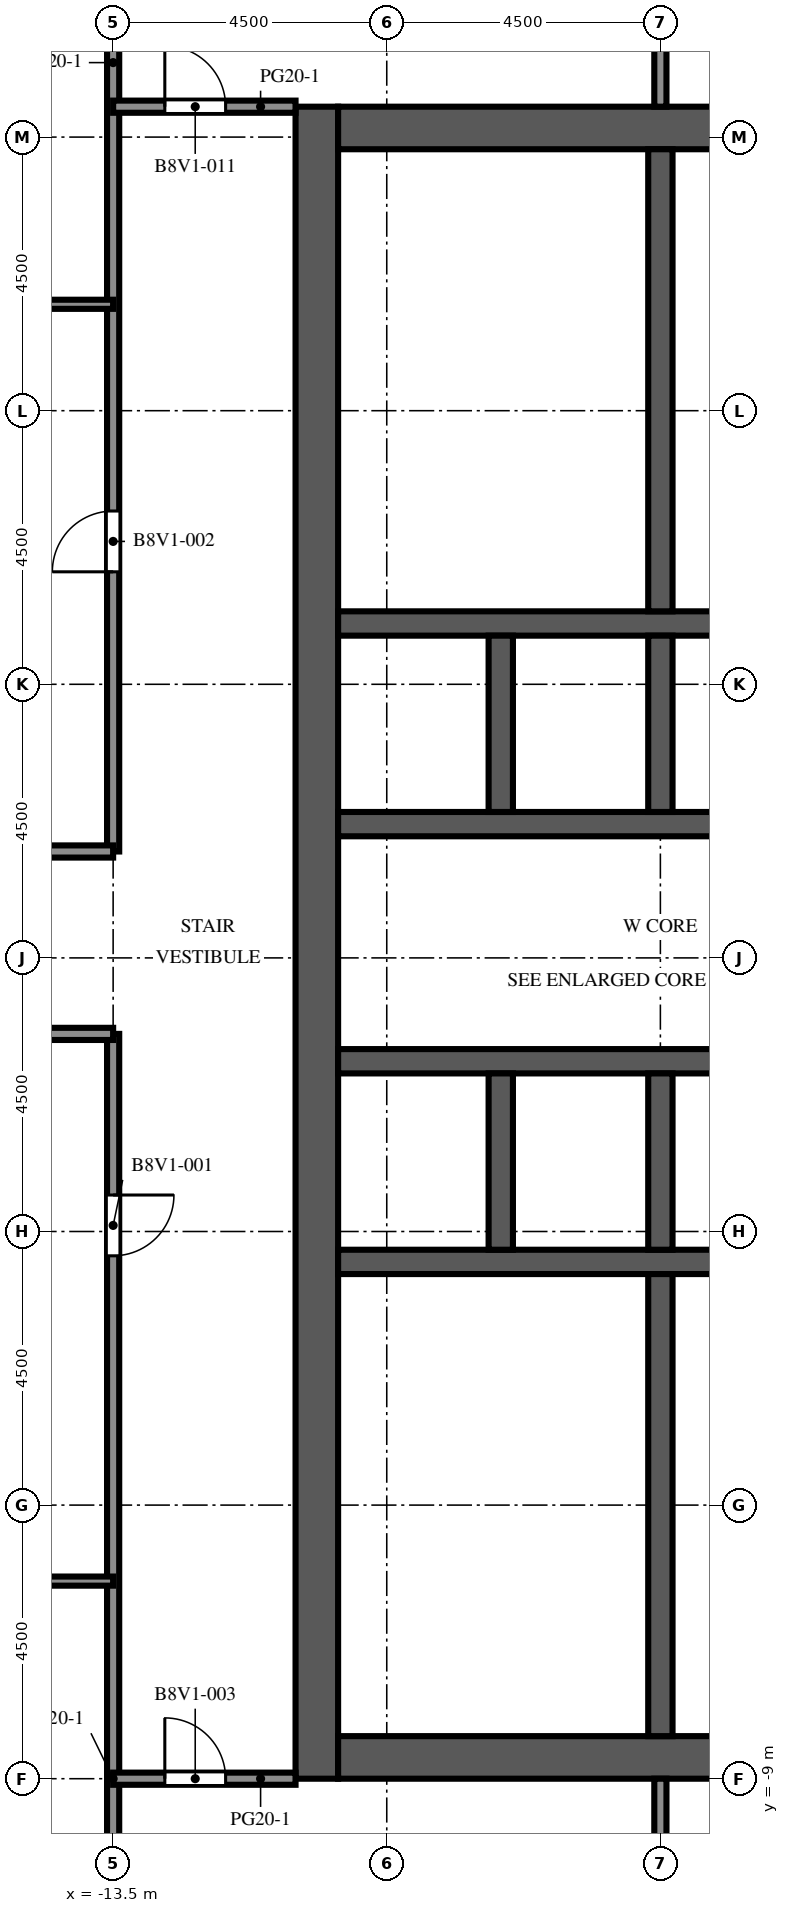
"""IFC4 building model, lengths in metres.
Left out: names, types, materials, properties, quantities, classifications, styles, units other than length and angle.
Written with IfcOpenShell. Run it as: python <this file> out.ifc"""

import sys

from ifc_helpers import new_model, si_unit, direction, frame, frame_2d, origin, place, context, subcontext, project, spatial, rectangle, extrude, element, fill, save


model = new_model("IFC4")
c1 = context("Model", 3, precision=1e-05, world=origin(), true_north=direction((0.0, 1.0)))
c2 = subcontext(c1, "Body", "Model", "MODEL_VIEW")
j1 = project(units=[si_unit("LENGTHUNIT", "METRE"), si_unit("PLANEANGLEUNIT", "RADIAN")], contexts=[c1])
p1 = place(None, origin())
s1 = spatial("IfcSite", under=j1, at=p1, CompositionType="ELEMENT")
p2 = place(p1, origin())
s2 = spatial("IfcBuilding", under=s1, at=p2, CompositionType="ELEMENT")
p3 = place(p2, frame((0.0, 0.0, 274.5)))
s3 = spatial("IfcBuildingStorey", under=s2, at=p3, CompositionType="ELEMENT", Elevation=274.5)
p4 = place(p3, frame((-10.15, -9.0, 0.0), z_axis=(0.0, 0.0, 1.0), x_axis=(0.0, 1.0, 0.0)))
e1 = element("IfcWall", 1, at=p4, inside=s3, PredefinedType="SHEAR", context=c2, shape_type="SweptSolid", body=[
    extrude(rectangle(XDim=27.5, YDim=0.7, at=frame_2d((13.75, 0.0))), origin(), (0.0, 0.0, 1.0), 4.1),
])
p5 = place(p4, frame((12.55, 0.0, 0.0)))
e2 = element("IfcOpeningElement", 2, at=p5, cuts=e1, PredefinedType="OPENING", context=c2, shape_type="SweptSolid", body=[
    extrude(rectangle(XDim=2.4, YDim=2.4, at=frame_2d((1.2, 1.2))), frame((0.0, 0.36, 0.0), z_axis=(0.0, -1.0, 0.0), x_axis=(1.0, 0.0, 0.0)), (0.0, 0.0, 1.0), 0.72),
])
p6 = place(p4, frame((6.825, 0.0, 0.0)))
e3 = element("IfcOpeningElement", 3, at=p6, cuts=e1, PredefinedType="OPENING", context=c2, shape_type="SweptSolid", body=[
    extrude(rectangle(XDim=1.2, YDim=2.1, at=frame_2d((0.6, 1.05))), frame((0.0, 0.36, 0.0), z_axis=(0.0, -1.0, 0.0), x_axis=(1.0, 0.0, 0.0)), (0.0, 0.0, 1.0), 0.72),
])
p7 = place(p4, frame((19.475, 0.0, 0.0)))
e4 = element("IfcOpeningElement", 4, at=p7, cuts=e1, PredefinedType="OPENING", context=c2, shape_type="SweptSolid", body=[
    extrude(rectangle(XDim=1.2, YDim=2.1, at=frame_2d((0.6, 1.05))), frame((0.0, 0.36, 0.0), z_axis=(0.0, -1.0, 0.0), x_axis=(1.0, 0.0, 0.0)), (0.0, 0.0, 1.0), 0.72),
])
for number, where, z_axis, x_axis in (
    (5, (-9.8, -8.65, 0.0), (0.0, 0.0, 1.0), (1.0, 0.0, 0.0)),
    (6, (-9.8, 18.15, 0.0), (0.0, 0.0, 1.0), (1.0, 0.0, 0.0)),
):
    element("IfcWall", number, at=place(p3, frame(where, z_axis=z_axis, x_axis=x_axis)), inside=s3, PredefinedType="SHEAR", context=c2, shape_type="SweptSolid", body=[
        extrude(rectangle(XDim=10.6, YDim=0.7, at=frame_2d((5.3, 0.0))), origin(), (0.0, 0.0, 1.0), 4.1),
    ])
p8 = place(p3, frame((-9.8, -0.5, 0.0), z_axis=(0.0, 0.0, 1.0), x_axis=(1.0, 0.0, 0.0)))
e7 = element("IfcWall", 7, at=p8, inside=s3, PredefinedType="SHEAR", context=c2, shape_type="SweptSolid", body=[
    extrude(rectangle(XDim=10.6, YDim=0.4, at=frame_2d((5.3, 0.0))), origin(), (0.0, 0.0, 1.0), 4.1),
])
p9 = place(p3, frame((-9.8, 2.8, 0.0), z_axis=(0.0, 0.0, 1.0), x_axis=(1.0, 0.0, 0.0)))
e8 = element("IfcWall", 8, at=p9, inside=s3, PredefinedType="SHEAR", context=c2, shape_type="SweptSolid", body=[
    extrude(rectangle(XDim=10.6, YDim=0.4, at=frame_2d((5.3, 0.0))), origin(), (0.0, 0.0, 1.0), 4.1),
])
p10 = place(p9, frame((0.688, 0.0, 0.0)))
e9 = element("IfcOpeningElement", 9, at=p10, cuts=e8, PredefinedType="OPENING", context=c2, shape_type="SweptSolid", body=[
    extrude(rectangle(XDim=1.1, YDim=2.1, at=frame_2d((0.55, 1.05))), frame((0.0, 0.21, 0.0), z_axis=(0.0, -1.0, 0.0), x_axis=(1.0, 0.0, 0.0)), (0.0, 0.0, 1.0), 0.42),
])
p11 = place(p9, frame((3.438, 0.0, 0.0)))
e10 = element("IfcOpeningElement", 10, at=p11, cuts=e8, PredefinedType="OPENING", context=c2, shape_type="SweptSolid", body=[
    extrude(rectangle(XDim=1.1, YDim=2.1, at=frame_2d((0.55, 1.05))), frame((0.0, 0.21, 0.0), z_axis=(0.0, -1.0, 0.0), x_axis=(1.0, 0.0, 0.0)), (0.0, 0.0, 1.0), 0.42),
])
p12 = place(p9, frame((6.113, 0.0, 0.0)))
e11 = element("IfcOpeningElement", 11, at=p12, cuts=e8, PredefinedType="OPENING", context=c2, shape_type="SweptSolid", body=[
    extrude(rectangle(XDim=1.0, YDim=2.1, at=frame_2d((0.5, 1.05))), frame((0.0, 0.21, 0.0), z_axis=(0.0, -1.0, 0.0), x_axis=(1.0, 0.0, 0.0)), (0.0, 0.0, 1.0), 0.42),
])
p13 = place(p9, frame((8.863, 0.0, 0.0)))
e12 = element("IfcOpeningElement", 12, at=p13, cuts=e8, PredefinedType="OPENING", context=c2, shape_type="SweptSolid", body=[
    extrude(rectangle(XDim=1.0, YDim=2.1, at=frame_2d((0.5, 1.05))), frame((0.0, 0.21, 0.0), z_axis=(0.0, -1.0, 0.0), x_axis=(1.0, 0.0, 0.0)), (0.0, 0.0, 1.0), 0.42),
])
p14 = place(p3, frame((-9.8, 6.7, 0.0), z_axis=(0.0, 0.0, 1.0), x_axis=(1.0, 0.0, 0.0)))
e13 = element("IfcWall", 13, at=p14, inside=s3, PredefinedType="SHEAR", context=c2, shape_type="SweptSolid", body=[
    extrude(rectangle(XDim=10.6, YDim=0.4, at=frame_2d((5.3, 0.0))), origin(), (0.0, 0.0, 1.0), 4.1),
])
p15 = place(p14, frame((3.438, 0.0, 0.0)))
e14 = element("IfcOpeningElement", 14, at=p15, cuts=e13, PredefinedType="OPENING", context=c2, shape_type="SweptSolid", body=[
    extrude(rectangle(XDim=1.1, YDim=2.1, at=frame_2d((0.55, 1.05))), frame((0.0, 0.21, 0.0), z_axis=(0.0, -1.0, 0.0), x_axis=(1.0, 0.0, 0.0)), (0.0, 0.0, 1.0), 0.42),
])
p16 = place(p14, frame((6.062, 0.0, 0.0)))
e15 = element("IfcOpeningElement", 15, at=p16, cuts=e13, PredefinedType="OPENING", context=c2, shape_type="SweptSolid", body=[
    extrude(rectangle(XDim=1.1, YDim=2.1, at=frame_2d((0.55, 1.05))), frame((0.0, 0.21, 0.0), z_axis=(0.0, -1.0, 0.0), x_axis=(1.0, 0.0, 0.0)), (0.0, 0.0, 1.0), 0.42),
])
p17 = place(p14, frame((8.812, 0.0, 0.0)))
e16 = element("IfcOpeningElement", 16, at=p17, cuts=e13, PredefinedType="OPENING", context=c2, shape_type="SweptSolid", body=[
    extrude(rectangle(XDim=1.1, YDim=2.1, at=frame_2d((0.55, 1.05))), frame((0.0, 0.21, 0.0), z_axis=(0.0, -1.0, 0.0), x_axis=(1.0, 0.0, 0.0)), (0.0, 0.0, 1.0), 0.42),
])
p18 = place(p14, frame((0.738, 0.0, 0.0)))
e17 = element("IfcOpeningElement", 17, at=p18, cuts=e13, PredefinedType="OPENING", context=c2, shape_type="SweptSolid", body=[
    extrude(rectangle(XDim=1.0, YDim=2.1, at=frame_2d((0.5, 1.05))), frame((0.0, 0.21, 0.0), z_axis=(0.0, -1.0, 0.0), x_axis=(1.0, 0.0, 0.0)), (0.0, 0.0, 1.0), 0.42),
])
p19 = place(p3, frame((-9.8, 10.0, 0.0), z_axis=(0.0, 0.0, 1.0), x_axis=(1.0, 0.0, 0.0)))
e18 = element("IfcWall", 18, at=p19, inside=s3, PredefinedType="SHEAR", context=c2, shape_type="SweptSolid", body=[
    extrude(rectangle(XDim=10.6, YDim=0.4, at=frame_2d((5.3, 0.0))), origin(), (0.0, 0.0, 1.0), 4.1),
])
for number, where, z_axis, x_axis in (
    (19, (-7.125, -0.3, 0.0), (0.0, 0.0, 1.0), (0.0, 1.0, 0.0)),
    (20, (-7.125, 6.9, 0.0), (0.0, 0.0, 1.0), (0.0, 1.0, 0.0)),
    (21, (-4.5, -0.3, 0.0), (0.0, 0.0, 1.0), (0.0, 1.0, 0.0)),
    (22, (-4.5, 6.9, 0.0), (0.0, 0.0, 1.0), (0.0, 1.0, 0.0)),
):
    element("IfcWall", number, at=place(p3, frame(where, z_axis=z_axis, x_axis=x_axis)), inside=s3, PredefinedType="SHEAR", context=c2, shape_type="SweptSolid", body=[
        extrude(rectangle(XDim=2.9, YDim=0.4, at=frame_2d((1.45, 0.0))), origin(), (0.0, 0.0, 1.0), 4.1),
    ])
for number, where, z_axis, x_axis in (
    (23, (-4.5, -8.3, 0.0), (0.0, 0.0, 1.0), (0.0, 1.0, 0.0)),
    (24, (-4.5, 10.2, 0.0), (0.0, 0.0, 1.0), (0.0, 1.0, 0.0)),
):
    element("IfcWall", number, at=place(p3, frame(where, z_axis=z_axis, x_axis=x_axis)), inside=s3, PredefinedType="SHEAR", context=c2, shape_type="SweptSolid", body=[
        extrude(rectangle(XDim=7.6, YDim=0.4, at=frame_2d((3.8, 0.0))), origin(), (0.0, 0.0, 1.0), 4.1),
    ])
for number, where, z_axis, x_axis in (
    (25, (-4.3, -6.02, 0.0), (0.0, 0.0, 1.0), (1.0, 0.0, 0.0)),
    (26, (-4.3, -2.98, 0.0), (0.0, 0.0, 1.0), (1.0, 0.0, 0.0)),
):
    element("IfcWall", number, at=place(p3, frame(where, z_axis=z_axis, x_axis=x_axis)), inside=s3, PredefinedType="PARTITIONING", context=c2, shape_type="SweptSolid", body=[
        extrude(rectangle(XDim=3.5, YDim=0.1, at=frame_2d((1.75, 0.0))), origin(), (0.0, 0.0, 1.0), 3.65),
    ])
for number, where, z_axis, x_axis in (
    (27, (-4.3, 11.72, 0.0), (0.0, 0.0, 1.0), (1.0, 0.0, 0.0)),
    (28, (-4.3, 13.62, 0.0), (0.0, 0.0, 1.0), (1.0, 0.0, 0.0)),
    (29, (-4.3, 15.9, 0.0), (0.0, 0.0, 1.0), (1.0, 0.0, 0.0)),
):
    element("IfcWall", number, at=place(p3, frame(where, z_axis=z_axis, x_axis=x_axis)), inside=s3, PredefinedType="PARTITIONING", context=c2, shape_type="SweptSolid", body=[
        extrude(rectangle(XDim=5.1, YDim=0.1, at=frame_2d((2.55, 0.0))), origin(), (0.0, 0.0, 1.0), 3.65),
    ])
p20 = place(p3, frame((-13.5, -17.6, 0.0), z_axis=(0.0, 0.0, 1.0), x_axis=(0.0, 1.0, 0.0)))
e30 = element("IfcWall", 30, at=p20, inside=s3, PredefinedType="PARTITIONING", context=c2, shape_type="SweptSolid", body=[
    extrude(rectangle(XDim=20.85, YDim=0.2, at=frame_2d((10.425, 0.0))), origin(), (0.0, 0.0, 1.0), 3.65),
])
p21 = place(p20, frame((17.2, 0.0, 0.0)))
e31 = element("IfcOpeningElement", 31, at=p21, cuts=e30, PredefinedType="OPENING", context=c2, shape_type="SweptSolid", body=[
    extrude(rectangle(XDim=1.0, YDim=2.1, at=frame_2d((0.5, 1.05))), frame((0.0, 0.11, 0.0), z_axis=(0.0, -1.0, 0.0), x_axis=(1.0, 0.0, 0.0)), (0.0, 0.0, 1.0), 0.22),
])
p22 = place(p3, frame((-13.5, 6.25, 0.0), z_axis=(0.0, 0.0, 1.0), x_axis=(0.0, 1.0, 0.0)))
e32 = element("IfcWall", 32, at=p22, inside=s3, PredefinedType="PARTITIONING", context=c2, shape_type="SweptSolid", body=[
    extrude(rectangle(XDim=20.35, YDim=0.2, at=frame_2d((10.175, 0.0))), origin(), (0.0, 0.0, 1.0), 3.65),
])
p23 = place(p22, frame((4.6, 0.0, 0.0)))
e33 = element("IfcOpeningElement", 33, at=p23, cuts=e32, PredefinedType="OPENING", context=c2, shape_type="SweptSolid", body=[
    extrude(rectangle(XDim=1.0, YDim=2.1, at=frame_2d((0.5, 1.05))), frame((0.0, 0.11, 0.0), z_axis=(0.0, -1.0, 0.0), x_axis=(1.0, 0.0, 0.0)), (0.0, 0.0, 1.0), 0.22),
])
p24 = place(p3, frame((-4.5, -17.6, 0.0), z_axis=(0.0, 0.0, 1.0), x_axis=(0.0, 1.0, 0.0)))
e34 = element("IfcWall", 34, at=p24, inside=s3, PredefinedType="PARTITIONING", context=c2, shape_type="SweptSolid", body=[
    extrude(rectangle(XDim=8.6, YDim=0.2, at=frame_2d((4.3, 0.0))), origin(), (0.0, 0.0, 1.0), 3.65),
])
p25 = place(p3, frame((-4.5, 18.5, 0.0), z_axis=(0.0, 0.0, 1.0), x_axis=(0.0, 1.0, 0.0)))
e35 = element("IfcWall", 35, at=p25, inside=s3, PredefinedType="PARTITIONING", context=c2, shape_type="SweptSolid", body=[
    extrude(rectangle(XDim=8.1, YDim=0.2, at=frame_2d((4.05, 0.0))), origin(), (0.0, 0.0, 1.0), 3.65),
])
p26 = place(p3, frame((-10.5, -9.0, 0.0), z_axis=(0.0, 0.0, 1.0), x_axis=(-1.0, 0.0, 0.0)))
e36 = element("IfcWall", 36, at=p26, inside=s3, PredefinedType="PARTITIONING", context=c2, shape_type="SweptSolid", body=[
    extrude(rectangle(XDim=3.0, YDim=0.2, at=frame_2d((1.5, 0.0))), origin(), (0.0, 0.0, 1.0), 3.65),
])
p27 = place(p26, frame((1.15, 0.0, 0.0)))
e37 = element("IfcOpeningElement", 37, at=p27, cuts=e36, PredefinedType="OPENING", context=c2, shape_type="SweptSolid", body=[
    extrude(rectangle(XDim=1.0, YDim=2.1, at=frame_2d((0.5, 1.05))), frame((0.0, 0.11, 0.0), z_axis=(0.0, -1.0, 0.0), x_axis=(1.0, 0.0, 0.0)), (0.0, 0.0, 1.0), 0.22),
])
p28 = place(p3, frame((-13.5, -5.75, 0.0), z_axis=(0.0, 0.0, 1.0), x_axis=(-1.0, 0.0, 0.0)))
e38 = element("IfcWall", 38, at=p28, inside=s3, PredefinedType="PARTITIONING", context=c2, shape_type="SweptSolid", body=[
    extrude(rectangle(XDim=8.85, YDim=0.15, at=frame_2d((4.425, 0.0))), origin(), (0.0, 0.0, 1.0), 3.65),
])
p29 = place(p28, frame((4.15, 0.0, 0.0)))
e39 = element("IfcOpeningElement", 39, at=p29, cuts=e38, PredefinedType="OPENING", context=c2, shape_type="SweptSolid", body=[
    extrude(rectangle(XDim=1.0, YDim=2.1, at=frame_2d((0.5, 1.05))), frame((0.0, 0.085, 0.0), z_axis=(0.0, -1.0, 0.0), x_axis=(1.0, 0.0, 0.0)), (0.0, 0.0, 1.0), 0.17),
])
for number, where, z_axis, x_axis in (
    (40, (-22.35, 3.25, 0.0), (0.0, 0.0, 1.0), (1.0, 0.0, 0.0)),
    (41, (-22.35, 6.25, 0.0), (0.0, 0.0, 1.0), (1.0, 0.0, 0.0)),
):
    element("IfcWall", number, at=place(p3, frame(where, z_axis=z_axis, x_axis=x_axis)), inside=s3, PredefinedType="PARTITIONING", context=c2, shape_type="SweptSolid", body=[
        extrude(rectangle(XDim=8.85, YDim=0.2, at=frame_2d((4.425, 0.0))), origin(), (0.0, 0.0, 1.0), 3.65),
    ])
p30 = place(p3, frame((-22.35, 15.25, 0.0), z_axis=(0.0, 0.0, 1.0), x_axis=(1.0, 0.0, 0.0)))
e42 = element("IfcWall", 42, at=p30, inside=s3, PredefinedType="PARTITIONING", context=c2, shape_type="SweptSolid", body=[
    extrude(rectangle(XDim=8.85, YDim=0.15, at=frame_2d((4.425, 0.0))), origin(), (0.0, 0.0, 1.0), 3.65),
])
p31 = place(p30, frame((2.7, 0.0, 0.0)))
e43 = element("IfcOpeningElement", 43, at=p31, cuts=e42, PredefinedType="OPENING", context=c2, shape_type="SweptSolid", body=[
    extrude(rectangle(XDim=1.0, YDim=2.1, at=frame_2d((0.5, 1.05))), frame((0.0, 0.085, 0.0), z_axis=(0.0, -1.0, 0.0), x_axis=(1.0, 0.0, 0.0)), (0.0, 0.0, 1.0), 0.17),
])
p32 = place(p3, frame((-13.5, 18.5, 0.0), z_axis=(0.0, 0.0, 1.0), x_axis=(1.0, 0.0, 0.0)))
e44 = element("IfcWall", 44, at=p32, inside=s3, PredefinedType="PARTITIONING", context=c2, shape_type="SweptSolid", body=[
    extrude(rectangle(XDim=3.0, YDim=0.2, at=frame_2d((1.5, 0.0))), origin(), (0.0, 0.0, 1.0), 3.65),
])
p33 = place(p32, frame((0.85, 0.0, 0.0)))
e45 = element("IfcOpeningElement", 45, at=p33, cuts=e44, PredefinedType="OPENING", context=c2, shape_type="SweptSolid", body=[
    extrude(rectangle(XDim=1.0, YDim=2.1, at=frame_2d((0.5, 1.05))), frame((0.0, 0.11, 0.0), z_axis=(0.0, -1.0, 0.0), x_axis=(1.0, 0.0, 0.0)), (0.0, 0.0, 1.0), 0.22),
])
p34 = place(p10, origin())
e46 = element("IfcDoor", 46, at=p34, inside=s3, OperationType="DOUBLE_DOOR_SLIDING", PredefinedType="DOOR", context=c2, shape_type="SweptSolid", body=[
    extrude(rectangle(XDim=1.1, YDim=2.1, at=frame_2d((0.55, 1.05))), frame((0.0, 0.025, 0.0), z_axis=(0.0, -1.0, 0.0), x_axis=(1.0, 0.0, 0.0)), (0.0, 0.0, 1.0), 0.05),
])
fill(e9, e46)
p35 = place(p11, origin())
e47 = element("IfcDoor", 47, at=p35, inside=s3, OperationType="DOUBLE_DOOR_SLIDING", PredefinedType="DOOR", context=c2, shape_type="SweptSolid", body=[
    extrude(rectangle(XDim=1.1, YDim=2.1, at=frame_2d((0.55, 1.05))), frame((0.0, 0.025, 0.0), z_axis=(0.0, -1.0, 0.0), x_axis=(1.0, 0.0, 0.0)), (0.0, 0.0, 1.0), 0.05),
])
fill(e10, e47)
p36 = place(p15, origin())
e48 = element("IfcDoor", 48, at=p36, inside=s3, OperationType="DOUBLE_DOOR_SLIDING", PredefinedType="DOOR", context=c2, shape_type="SweptSolid", body=[
    extrude(rectangle(XDim=1.1, YDim=2.1, at=frame_2d((0.55, 1.05))), frame((0.0, 0.025, 0.0), z_axis=(0.0, -1.0, 0.0), x_axis=(1.0, 0.0, 0.0)), (0.0, 0.0, 1.0), 0.05),
])
fill(e14, e48)
p37 = place(p16, origin())
e49 = element("IfcDoor", 49, at=p37, inside=s3, OperationType="DOUBLE_DOOR_SLIDING", PredefinedType="DOOR", context=c2, shape_type="SweptSolid", body=[
    extrude(rectangle(XDim=1.1, YDim=2.1, at=frame_2d((0.55, 1.05))), frame((0.0, 0.025, 0.0), z_axis=(0.0, -1.0, 0.0), x_axis=(1.0, 0.0, 0.0)), (0.0, 0.0, 1.0), 0.05),
])
fill(e15, e49)
p38 = place(p5, origin())
e50 = element("IfcDoor", 50, at=p38, inside=s3, OperationType="DOUBLE_DOOR_DOUBLE_SWING", PredefinedType="DOOR", context=c2, shape_type="SweptSolid", body=[
    extrude(rectangle(XDim=2.4, YDim=2.4, at=frame_2d((1.2, 1.2))), frame((0.0, 0.025, 0.0), z_axis=(0.0, -1.0, 0.0), x_axis=(1.0, 0.0, 0.0)), (0.0, 0.0, 1.0), 0.05),
])
fill(e2, e50)
p39 = place(p6, origin())
e51 = element("IfcDoor", 51, at=p39, inside=s3, OperationType="SINGLE_SWING_LEFT", PredefinedType="DOOR", context=c2, shape_type="SweptSolid", body=[
    extrude(rectangle(XDim=1.2, YDim=2.1, at=frame_2d((0.6, 1.05))), frame((0.0, 0.025, 0.0), z_axis=(0.0, -1.0, 0.0), x_axis=(1.0, 0.0, 0.0)), (0.0, 0.0, 1.0), 0.05),
])
fill(e3, e51)
p40 = place(p7, origin())
e52 = element("IfcDoor", 52, at=p40, inside=s3, OperationType="SINGLE_SWING_LEFT", PredefinedType="DOOR", context=c2, shape_type="SweptSolid", body=[
    extrude(rectangle(XDim=1.2, YDim=2.1, at=frame_2d((0.6, 1.05))), frame((0.0, 0.025, 0.0), z_axis=(0.0, -1.0, 0.0), x_axis=(1.0, 0.0, 0.0)), (0.0, 0.0, 1.0), 0.05),
])
fill(e4, e52)
p41 = place(p18, origin())
e53 = element("IfcDoor", 53, at=p41, inside=s3, OperationType="SINGLE_SWING_LEFT", PredefinedType="DOOR", context=c2, shape_type="SweptSolid", body=[
    extrude(rectangle(XDim=1.0, YDim=2.1, at=frame_2d((0.5, 1.05))), frame((0.0, 0.025, 0.0), z_axis=(0.0, -1.0, 0.0), x_axis=(1.0, 0.0, 0.0)), (0.0, 0.0, 1.0), 0.05),
])
fill(e17, e53)
p42 = place(p21, origin())
e54 = element("IfcDoor", 54, at=p42, inside=s3, OperationType="SINGLE_SWING_RIGHT", PredefinedType="DOOR", context=c2, shape_type="SweptSolid", body=[
    extrude(rectangle(XDim=1.0, YDim=2.1, at=frame_2d((0.5, 1.05))), frame((0.0, 0.025, 0.0), z_axis=(0.0, -1.0, 0.0), x_axis=(1.0, 0.0, 0.0)), (0.0, 0.0, 1.0), 0.05),
])
fill(e31, e54)
p43 = place(p23, origin())
e55 = element("IfcDoor", 55, at=p43, inside=s3, OperationType="SINGLE_SWING_LEFT", PredefinedType="DOOR", context=c2, shape_type="SweptSolid", body=[
    extrude(rectangle(XDim=1.0, YDim=2.1, at=frame_2d((0.5, 1.05))), frame((0.0, 0.025, 0.0), z_axis=(0.0, -1.0, 0.0), x_axis=(1.0, 0.0, 0.0)), (0.0, 0.0, 1.0), 0.05),
])
fill(e33, e55)
p44 = place(p27, origin())
e56 = element("IfcDoor", 56, at=p44, inside=s3, OperationType="SINGLE_SWING_RIGHT", PredefinedType="DOOR", context=c2, shape_type="SweptSolid", body=[
    extrude(rectangle(XDim=1.0, YDim=2.1, at=frame_2d((0.5, 1.05))), frame((0.0, 0.025, 0.0), z_axis=(0.0, -1.0, 0.0), x_axis=(1.0, 0.0, 0.0)), (0.0, 0.0, 1.0), 0.05),
])
fill(e37, e56)
p45 = place(p33, origin())
e57 = element("IfcDoor", 57, at=p45, inside=s3, OperationType="SINGLE_SWING_LEFT", PredefinedType="DOOR", context=c2, shape_type="SweptSolid", body=[
    extrude(rectangle(XDim=1.0, YDim=2.1, at=frame_2d((0.5, 1.05))), frame((0.0, 0.025, 0.0), z_axis=(0.0, -1.0, 0.0), x_axis=(1.0, 0.0, 0.0)), (0.0, 0.0, 1.0), 0.05),
])
fill(e45, e57)
save(model, sys.argv[1])
